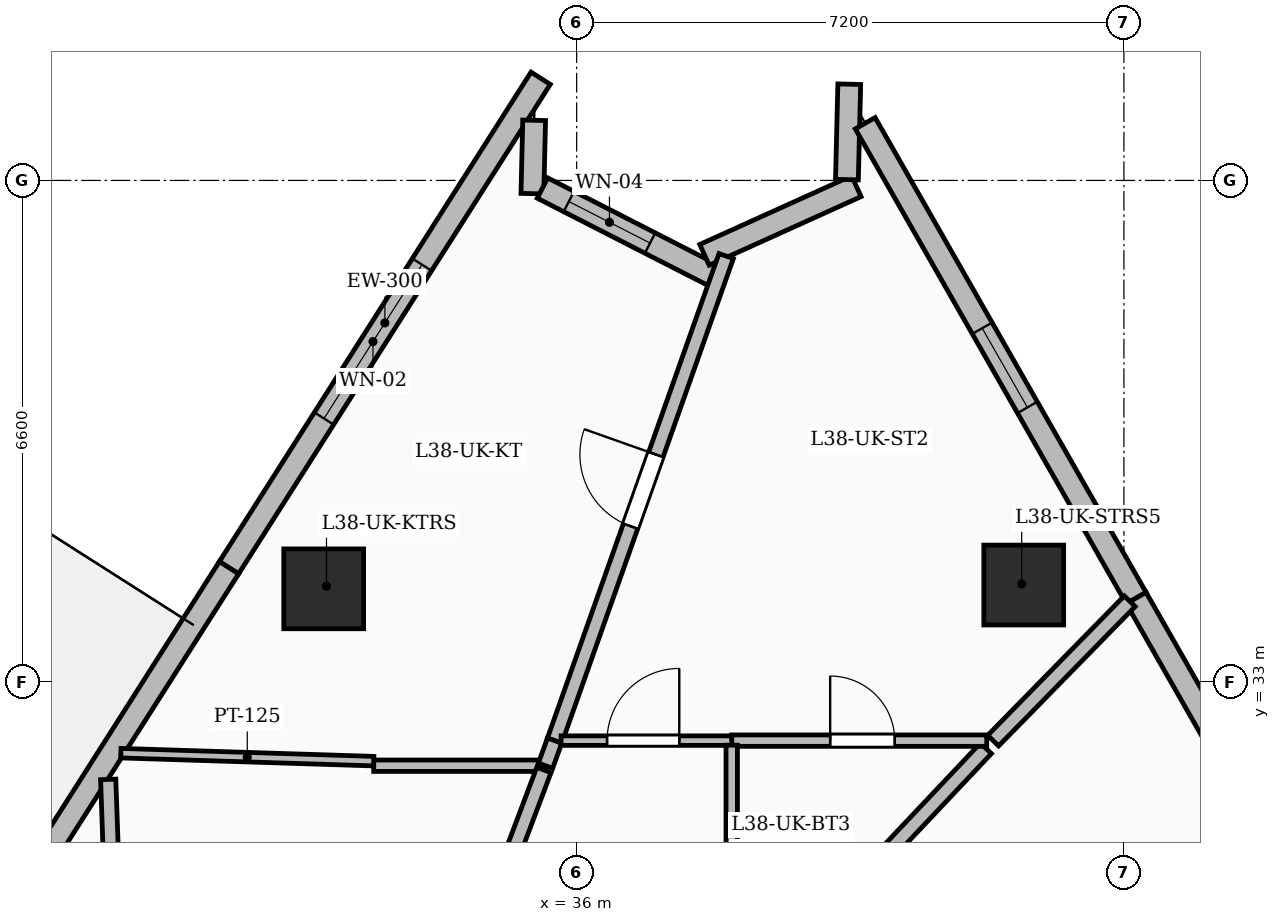
"""IFC4 building model, lengths in metres.
Left out: names, types, materials, properties, quantities, classifications, styles, units other than length and angle.
Written with IfcOpenShell. Run it as: python <this file> out.ifc"""

import sys

from ifc_helpers import new_model, si_unit, direction, frame, frame_2d, origin, origin_2d, place, context, subcontext, project, spatial, rectangle, extrude, element, fill, save


model = new_model("IFC4")
c1 = context("Model", 3, precision=1e-05, world=origin(), true_north=direction((0.0, 1.0)))
c2 = subcontext(c1, "Body", "Model", "MODEL_VIEW")
j1 = project(units=[si_unit("LENGTHUNIT", "METRE"), si_unit("PLANEANGLEUNIT", "RADIAN")], contexts=[c1])
p1 = place(None, origin())
s1 = spatial("IfcSite", under=j1, at=p1, CompositionType="ELEMENT")
p2 = place(p1, origin())
s2 = spatial("IfcBuilding", under=s1, at=p2, CompositionType="ELEMENT")
p3 = place(p2, frame((0.0, 0.0, 150.0)))
s3 = spatial("IfcBuildingStorey", under=s2, at=p3, CompositionType="ELEMENT", Elevation=150.0)
for number, where, z_axis, x_axis in (
    (1, (41.882, 34.277, 0.0), (0.0, 0.0, 1.0), (1.0, 0.0, 0.0)),
    (2, (32.672, 34.227, 0.0), (0.0, 0.0, 1.0), (1.0, 0.0, 0.0)),
):
    element("IfcColumn", number, at=place(p3, frame(where, z_axis=z_axis, x_axis=x_axis)), inside=s3, PredefinedType="COLUMN", context=c2, shape_type="SweptSolid", body=[
        extrude(rectangle(XDim=1.05, YDim=1.05, at=origin_2d()), origin(), (0.0, 0.0, 1.0), 3.6),
    ])
p4 = place(p3, frame((27.328, 28.069, 0.0), z_axis=(0.0, 0.0, 1.0), x_axis=(0.537125937868, 0.843502060975, 0.0)))
e3 = element("IfcWall", 3, at=p4, inside=s3, PredefinedType="SOLIDWALL", context=c2, shape_type="SweptSolid", body=[
    extrude(rectangle(XDim=7.632, YDim=0.3, at=frame_2d((3.816, 0.0))), origin(), (0.0, 0.0, 1.0), 3.35),
])
p5 = place(p4, frame((2.038, 0.0, 0.0)))
e4 = element("IfcOpeningElement", 4, at=p5, cuts=e3, PredefinedType="OPENING", context=c2, shape_type="SweptSolid", body=[
    extrude(rectangle(XDim=1.0, YDim=2.2, at=frame_2d((0.5, 1.1))), frame((0.0, 0.16, 0.0), z_axis=(0.0, -1.0, 0.0), x_axis=(1.0, 0.0, 0.0)), (0.0, 0.0, 1.0), 0.32),
])
p6 = place(p3, frame((31.427, 34.507, 0.0), z_axis=(0.0, 0.0, 1.0), x_axis=(0.537111444199, 0.843511290091, 0.0)))
e5 = element("IfcWall", 5, at=p6, inside=s3, PredefinedType="SOLIDWALL", context=c2, shape_type="SweptSolid", body=[
    extrude(rectangle(XDim=7.632, YDim=0.3, at=frame_2d((3.816, 0.0))), origin(), (0.0, 0.0, 1.0), 3.35),
])
p7 = place(p6, frame((2.325, 0.0, 0.6)))
e6 = element("IfcOpeningElement", 6, at=p7, cuts=e5, PredefinedType="OPENING", context=c2, shape_type="SweptSolid", body=[
    extrude(rectangle(XDim=2.4, YDim=2.1, at=frame_2d((1.2, 1.05))), frame((0.0, 0.16, 0.0), z_axis=(0.0, -1.0, 0.0), x_axis=(1.0, 0.0, 0.0)), (0.0, 0.0, 1.0), 0.32),
])
p8 = place(p3, frame((35.441, 40.391, 0.0), z_axis=(0.0, 0.0, 1.0), x_axis=(-0.023772687739, -0.999717389725, 0.0)))
e7 = element("IfcWall", 7, at=p8, inside=s3, PredefinedType="SOLIDWALL", context=c2, shape_type="SweptSolid", body=[
    extrude(rectangle(XDim=0.965, YDim=0.3, at=frame_2d((0.483, 0.0))), origin(), (0.0, 0.0, 1.0), 3.35),
])
p9 = place(p3, frame((35.55, 39.5, 0.0), z_axis=(0.0, 0.0, 1.0), x_axis=(0.890380498149, -0.455217056486, 0.0)))
e8 = element("IfcWall", 8, at=p9, inside=s3, PredefinedType="SOLIDWALL", context=c2, shape_type="SweptSolid", body=[
    extrude(rectangle(XDim=2.557, YDim=0.3, at=frame_2d((1.278, 0.0))), origin(), (0.0, 0.0, 1.0), 3.35),
])
p10 = place(p9, frame((0.39, 0.0, 0.8)))
e9 = element("IfcOpeningElement", 9, at=p10, cuts=e8, PredefinedType="OPENING", context=c2, shape_type="SweptSolid", body=[
    extrude(rectangle(XDim=1.2, YDim=1.8, at=frame_2d((0.6, 0.9))), frame((0.0, 0.16, 0.0), z_axis=(0.0, -1.0, 0.0), x_axis=(1.0, 0.0, 0.0)), (0.0, 0.0, 1.0), 0.32),
])
p11 = place(p3, frame((37.682, 38.621, 0.0), z_axis=(0.0, 0.0, 1.0), x_axis=(0.911287044452, 0.411771687486, 0.0)))
e10 = element("IfcWall", 10, at=p11, inside=s3, PredefinedType="SOLIDWALL", context=c2, shape_type="SweptSolid", body=[
    extrude(rectangle(XDim=2.193, YDim=0.3, at=frame_2d((1.096, 0.0))), origin(), (0.0, 0.0, 1.0), 3.35),
])
p12 = place(p3, frame((39.556, 39.611, 0.0), z_axis=(0.0, 0.0, 1.0), x_axis=(0.024501492699, 0.999699793366, 0.0)))
e11 = element("IfcWall", 11, at=p12, inside=s3, PredefinedType="SOLIDWALL", context=c2, shape_type="SweptSolid", body=[
    extrude(rectangle(XDim=1.256, YDim=0.3, at=frame_2d((0.628, 0.0))), origin(), (0.0, 0.0, 1.0), 3.35),
])
p13 = place(p3, frame((39.796, 40.353, 0.0), z_axis=(0.0, 0.0, 1.0), x_axis=(0.495663635242, -0.86851457138, 0.0)))
e12 = element("IfcWall", 12, at=p13, inside=s3, PredefinedType="SOLIDWALL", context=c2, shape_type="SweptSolid", body=[
    extrude(rectangle(XDim=7.192, YDim=0.3, at=frame_2d((3.596, 0.0))), origin(), (0.0, 0.0, 1.0), 3.35),
])
p14 = place(p13, frame((3.105, 0.0, 0.8)))
e13 = element("IfcOpeningElement", 13, at=p14, cuts=e12, PredefinedType="OPENING", context=c2, shape_type="SweptSolid", body=[
    extrude(rectangle(XDim=1.2, YDim=1.8, at=frame_2d((0.6, 0.9))), frame((0.0, 0.16, 0.0), z_axis=(0.0, -1.0, 0.0), x_axis=(1.0, 0.0, 0.0)), (0.0, 0.0, 1.0), 0.32),
])
p15 = place(p3, frame((43.361, 34.106, 0.0), z_axis=(0.0, 0.0, 1.0), x_axis=(0.495668037993, -0.868512058703, 0.0)))
e14 = element("IfcWall", 14, at=p15, inside=s3, PredefinedType="SOLIDWALL", context=c2, shape_type="SweptSolid", body=[
    extrude(rectangle(XDim=7.762, YDim=0.3, at=frame_2d((3.881, 0.0))), origin(), (0.0, 0.0, 1.0), 3.35),
])
p16 = place(p15, frame((2.575, 0.0, 0.6)))
e15 = element("IfcOpeningElement", 15, at=p16, cuts=e14, PredefinedType="OPENING", context=c2, shape_type="SweptSolid", body=[
    extrude(rectangle(XDim=2.4, YDim=2.1, at=frame_2d((1.2, 1.05))), frame((0.0, 0.16, 0.0), z_axis=(0.0, -1.0, 0.0), x_axis=(1.0, 0.0, 0.0)), (0.0, 0.0, 1.0), 0.32),
])
p17 = place(p3, frame((30.097, 24.285, 0.0), z_axis=(0.0, 0.0, 1.0), x_axis=(-0.035014963649, 0.999386788146, 0.0)))
e16 = element("IfcWall", 16, at=p17, inside=s3, PredefinedType="PARTITIONING", context=c2, shape_type="SweptSolid", body=[
    extrude(rectangle(XDim=7.44, YDim=0.2, at=frame_2d((3.72, 0.0))), origin(), (0.0, 0.0, 1.0), 2.57),
])
p18 = place(p3, frame((43.276, 34.064, 0.0), z_axis=(0.0, 0.0, 1.0), x_axis=(-0.699649070919, -0.714486653173, 0.0)))
e17 = element("IfcWall", 17, at=p18, inside=s3, PredefinedType="PARTITIONING", context=c2, shape_type="SweptSolid", body=[
    extrude(rectangle(XDim=2.567, YDim=0.2, at=frame_2d((1.283, 0.0))), origin(), (0.0, 0.0, 1.0), 1.12),
])
p19 = place(p3, frame((41.384, 32.128, 0.0), z_axis=(0.0, 0.0, 1.0), x_axis=(-0.686445904879, -0.727180871362, 0.0)))
e18 = element("IfcWall", 18, at=p19, inside=s3, PredefinedType="PARTITIONING", context=c2, shape_type="SweptSolid", body=[
    extrude(rectangle(XDim=3.956, YDim=0.2, at=frame_2d((1.978, 0.0))), origin(), (0.0, 0.0, 1.0), 2.86),
])
p20 = place(p3, frame((35.59, 31.9, 0.0), z_axis=(0.0, 0.0, 1.0), x_axis=(-1.0, 0.0, 0.0)))
e19 = element("IfcWall", 19, at=p20, inside=s3, PredefinedType="PARTITIONING", context=c2, shape_type="SweptSolid", body=[
    extrude(rectangle(XDim=2.26, YDim=0.15, at=frame_2d((1.13, 0.0))), origin(), (0.0, 0.0, 1.0), 1.12),
])
p21 = place(p3, frame((33.33, 25.9, 0.0), z_axis=(0.0, 0.0, 1.0), x_axis=(0.352466793528, 0.935824320832, 0.0)))
e20 = element("IfcWall", 20, at=p21, inside=s3, PredefinedType="PARTITIONING", context=c2, shape_type="SweptSolid", body=[
    extrude(rectangle(XDim=6.352, YDim=0.2, at=frame_2d((3.176, 0.0))), origin(), (0.0, 0.0, 1.0), 1.12),
])
p22 = place(p3, frame((35.71, 32.23, 0.0), z_axis=(0.0, 0.0, 1.0), x_axis=(0.333750909116, 0.942661302199, 0.0)))
e21 = element("IfcWall", 21, at=p22, inside=s3, PredefinedType="PARTITIONING", context=c2, shape_type="SweptSolid", body=[
    extrude(rectangle(XDim=6.763, YDim=0.2, at=frame_2d((3.381, 0.0))), origin(), (0.0, 0.0, 1.0), 2.57),
])
p23 = place(p22, frame((2.993, 0.0, 0.0)))
e22 = element("IfcOpeningElement", 22, at=p23, cuts=e21, PredefinedType="OPENING", context=c2, shape_type="SweptSolid", body=[
    extrude(rectangle(XDim=1.0, YDim=2.2, at=frame_2d((0.5, 1.1))), frame((0.0, 0.11, 0.0), z_axis=(0.0, -1.0, 0.0), x_axis=(1.0, 0.0, 0.0)), (0.0, 0.0, 1.0), 0.22),
])
p24 = place(p3, frame((35.59, 31.9, 0.0), z_axis=(0.0, 0.0, 1.0), x_axis=(0.341352290296, 0.939935430713, 0.0)))
e23 = element("IfcWall", 23, at=p24, inside=s3, PredefinedType="PARTITIONING", context=c2, shape_type="SweptSolid", body=[
    extrude(rectangle(XDim=0.351, YDim=0.2, at=frame_2d((0.176, 0.0))), origin(), (0.0, 0.0, 1.0), 3.35),
])
p25 = place(p3, frame((38.04, 32.23, 0.0), z_axis=(0.0, 0.0, 1.0), x_axis=(1.0, 0.0, 0.0)))
e24 = element("IfcWall", 24, at=p25, inside=s3, PredefinedType="PARTITIONING", context=c2, shape_type="SweptSolid", body=[
    extrude(rectangle(XDim=3.355, YDim=0.15, at=frame_2d((1.677, 0.0))), origin(), (0.0, 0.0, 1.0), 3.35),
])
p26 = place(p25, frame((1.295, 0.0, 0.0)))
e25 = element("IfcOpeningElement", 25, at=p26, cuts=e24, PredefinedType="OPENING", context=c2, shape_type="SweptSolid", body=[
    extrude(rectangle(XDim=0.85, YDim=2.1, at=frame_2d((0.425, 1.05))), frame((0.0, 0.085, 0.0), z_axis=(0.0, -1.0, 0.0), x_axis=(1.0, 0.0, 0.0)), (0.0, 0.0, 1.0), 0.17),
])
p27 = place(p3, frame((35.795, 32.23, 0.0), z_axis=(0.0, 0.0, 1.0), x_axis=(1.0, 0.0, 0.0)))
e26 = element("IfcWall", 26, at=p27, inside=s3, PredefinedType="PARTITIONING", context=c2, shape_type="SweptSolid", body=[
    extrude(rectangle(XDim=2.245, YDim=0.125, at=frame_2d((1.123, 0.0))), origin(), (0.0, 0.0, 1.0), 3.35),
])
p28 = place(p27, frame((0.605, 0.0, 0.0)))
e27 = element("IfcOpeningElement", 27, at=p28, cuts=e26, PredefinedType="OPENING", context=c2, shape_type="SweptSolid", body=[
    extrude(rectangle(XDim=0.95, YDim=2.2, at=frame_2d((0.475, 1.1))), frame((0.0, 0.072, 0.0), z_axis=(0.0, -1.0, 0.0), x_axis=(1.0, 0.0, 0.0)), (0.0, 0.0, 1.0), 0.145),
])
p29 = place(p3, frame((38.04, 32.17, 0.0), z_axis=(0.0, 0.0, 1.0), x_axis=(0.0, -1.0, 0.0)))
e28 = element("IfcWall", 28, at=p29, inside=s3, PredefinedType="PARTITIONING", context=c2, shape_type="SweptSolid", body=[
    extrude(rectangle(XDim=3.505, YDim=0.15, at=frame_2d((1.752, 0.0))), origin(), (0.0, 0.0, 1.0), 2.86),
])
p30 = place(p3, frame((33.33, 31.96, 0.0), z_axis=(0.0, 0.0, 1.0), x_axis=(-0.999502585392, 0.03153699088, 0.0)))
e29 = element("IfcWall", 29, at=p30, inside=s3, PredefinedType="PARTITIONING", context=c2, shape_type="SweptSolid", body=[
    extrude(rectangle(XDim=3.329, YDim=0.125, at=frame_2d((1.665, 0.0))), origin(), (0.0, 0.0, 1.0), 1.12),
])
p31 = place(p7, origin())
e30 = element("IfcWindow", 30, at=p31, inside=s3, PartitioningType="SINGLE_PANEL", PredefinedType="WINDOW", context=c2, shape_type="SweptSolid", body=[
    extrude(rectangle(XDim=2.4, YDim=2.1, at=frame_2d((1.2, 1.05))), frame((0.0, 0.03, 0.0), z_axis=(0.0, -1.0, 0.0), x_axis=(1.0, 0.0, 0.0)), (0.0, 0.0, 1.0), 0.06),
])
fill(e6, e30)
p32 = place(p10, origin())
e31 = element("IfcWindow", 31, at=p32, inside=s3, PartitioningType="SINGLE_PANEL", PredefinedType="WINDOW", context=c2, shape_type="SweptSolid", body=[
    extrude(rectangle(XDim=1.2, YDim=1.8, at=frame_2d((0.6, 0.9))), frame((0.0, 0.03, 0.0), z_axis=(0.0, -1.0, 0.0), x_axis=(1.0, 0.0, 0.0)), (0.0, 0.0, 1.0), 0.06),
])
fill(e9, e31)
p33 = place(p14, origin())
e32 = element("IfcWindow", 32, at=p33, inside=s3, PartitioningType="SINGLE_PANEL", PredefinedType="WINDOW", context=c2, shape_type="SweptSolid", body=[
    extrude(rectangle(XDim=1.2, YDim=1.8, at=frame_2d((0.6, 0.9))), frame((0.0, 0.03, 0.0), z_axis=(0.0, -1.0, 0.0), x_axis=(1.0, 0.0, 0.0)), (0.0, 0.0, 1.0), 0.06),
])
fill(e13, e32)
p34 = place(p28, origin())
e33 = element("IfcDoor", 33, at=p34, inside=s3, OperationType="SINGLE_SWING_RIGHT", PredefinedType="DOOR", context=c2, shape_type="SweptSolid", body=[
    extrude(rectangle(XDim=0.95, YDim=2.2, at=frame_2d((0.475, 1.1))), frame((0.0, 0.025, 0.0), z_axis=(0.0, -1.0, 0.0), x_axis=(1.0, 0.0, 0.0)), (0.0, 0.0, 1.0), 0.05),
])
fill(e27, e33)
p35 = place(p26, origin())
e34 = element("IfcDoor", 34, at=p35, inside=s3, OperationType="SINGLE_SWING_LEFT", PredefinedType="DOOR", context=c2, shape_type="SweptSolid", body=[
    extrude(rectangle(XDim=0.85, YDim=2.1, at=frame_2d((0.425, 1.05))), frame((0.0, 0.025, 0.0), z_axis=(0.0, -1.0, 0.0), x_axis=(1.0, 0.0, 0.0)), (0.0, 0.0, 1.0), 0.05),
])
fill(e25, e34)
p36 = place(p23, origin())
e35 = element("IfcDoor", 35, at=p36, inside=s3, OperationType="SINGLE_SWING_RIGHT", PredefinedType="DOOR", context=c2, shape_type="SweptSolid", body=[
    extrude(rectangle(XDim=1.0, YDim=2.2, at=frame_2d((0.5, 1.1))), frame((0.0, 0.025, 0.0), z_axis=(0.0, -1.0, 0.0), x_axis=(1.0, 0.0, 0.0)), (0.0, 0.0, 1.0), 0.05),
])
fill(e22, e35)
save(model, sys.argv[1])
